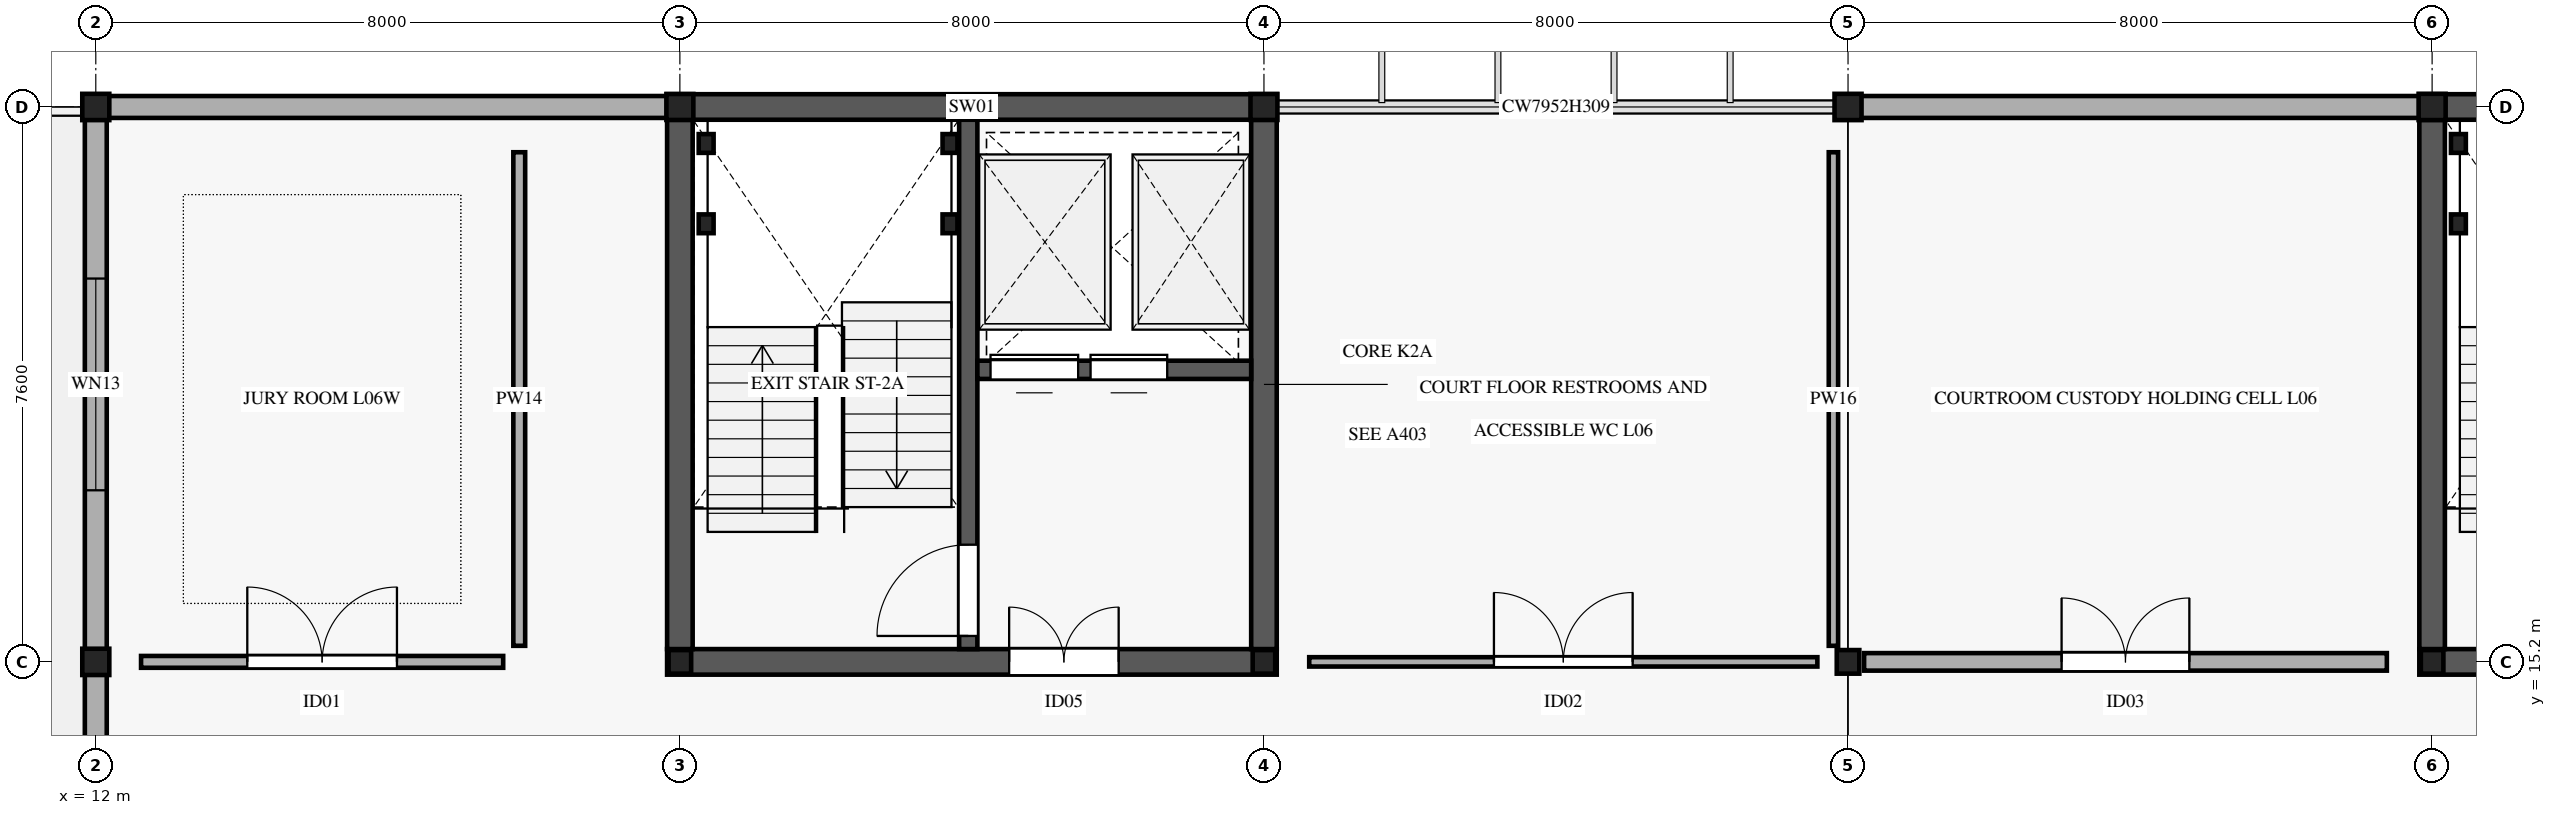
"""IFC4 building model, lengths in metres.
Left out: names, types, materials, properties, quantities, classifications, styles, units other than length and angle.
Written with IfcOpenShell. Run it as: python <this file> out.ifc"""

import sys

from ifc_helpers import new_model, si_unit, direction, frame, frame_2d, origin, origin_2d, place, context, subcontext, project, spatial, rectangle, i_section, extrude, element, fill, save


model = new_model("IFC4")
c1 = context("Model", 3, precision=1e-05, world=origin(), true_north=direction((0.0, 1.0)))
c2 = subcontext(c1, "Body", "Model", "MODEL_VIEW")
j1 = project(units=[si_unit("LENGTHUNIT", "METRE"), si_unit("PLANEANGLEUNIT", "RADIAN")], contexts=[c1])
p1 = place(None, origin())
s1 = spatial("IfcSite", under=j1, at=p1, CompositionType="ELEMENT")
p2 = place(p1, origin())
s2 = spatial("IfcBuilding", under=s1, at=p2, CompositionType="ELEMENT")
p3 = place(p2, frame((0.0, 0.0, 29.4)))
s3 = spatial("IfcBuildingStorey", under=s2, at=p3, CompositionType="ELEMENT", Elevation=29.4)
for number, where, z_axis, x_axis in (
    (1, (12.0, 15.2, 0.0), (0.0, 0.0, 1.0), (1.0, 0.0, 0.0)),
    (2, (12.0, 22.8, 0.0), (0.0, 0.0, 1.0), (1.0, 0.0, 0.0)),
):
    element("IfcColumn", number, at=place(p3, frame(where, z_axis=z_axis, x_axis=x_axis)), inside=s3, PredefinedType="COLUMN", context=c2, shape_type="SweptSolid", body=[
        extrude(i_section(OverallWidth=0.37, OverallDepth=0.36, WebThickness=0.012, FlangeThickness=0.02, FilletRadius=0.015, at=origin_2d()), origin(), (0.0, 0.0, 1.0), 4.0),
    ])
p4 = place(p3, frame((20.0, 15.2, 0.0), z_axis=(0.0, 0.0, 1.0), x_axis=(1.0, 0.0, 0.0)))
e3 = element("IfcColumn", 3, at=p4, inside=s3, PredefinedType="COLUMN", context=c2, shape_type="SweptSolid", body=[
    extrude(i_section(OverallWidth=0.309, OverallDepth=0.323, WebThickness=0.014, FlangeThickness=0.023, FilletRadius=0.015, at=origin_2d()), origin(), (0.0, 0.0, 1.0), 4.0),
])
p5 = place(p3, frame((20.0, 22.8, 0.0), z_axis=(0.0, 0.0, 1.0), x_axis=(1.0, 0.0, 0.0)))
e4 = element("IfcColumn", 4, at=p5, inside=s3, PredefinedType="COLUMN", context=c2, shape_type="SweptSolid", body=[
    extrude(i_section(OverallWidth=0.369, OverallDepth=0.356, WebThickness=0.011, FlangeThickness=0.018, FilletRadius=0.015, at=origin_2d()), origin(), (0.0, 0.0, 1.0), 4.0),
])
p6 = place(p3, frame((28.0, 15.2, 0.0), z_axis=(0.0, 0.0, 1.0), x_axis=(1.0, 0.0, 0.0)))
e5 = element("IfcColumn", 5, at=p6, inside=s3, PredefinedType="COLUMN", context=c2, shape_type="SweptSolid", body=[
    extrude(i_section(OverallWidth=0.309, OverallDepth=0.323, WebThickness=0.014, FlangeThickness=0.023, FilletRadius=0.015, at=origin_2d()), origin(), (0.0, 0.0, 1.0), 4.0),
])
p7 = place(p3, frame((28.0, 22.8, 0.0), z_axis=(0.0, 0.0, 1.0), x_axis=(1.0, 0.0, 0.0)))
e6 = element("IfcColumn", 6, at=p7, inside=s3, PredefinedType="COLUMN", context=c2, shape_type="SweptSolid", body=[
    extrude(i_section(OverallWidth=0.369, OverallDepth=0.356, WebThickness=0.011, FlangeThickness=0.018, FilletRadius=0.015, at=origin_2d()), origin(), (0.0, 0.0, 1.0), 4.0),
])
p8 = place(p3, frame((36.0, 15.2, 0.0), z_axis=(0.0, 0.0, 1.0), x_axis=(1.0, 0.0, 0.0)))
e7 = element("IfcColumn", 7, at=p8, inside=s3, PredefinedType="COLUMN", context=c2, shape_type="SweptSolid", body=[
    extrude(i_section(OverallWidth=0.309, OverallDepth=0.323, WebThickness=0.014, FlangeThickness=0.023, FilletRadius=0.015, at=origin_2d()), origin(), (0.0, 0.0, 1.0), 4.0),
])
p9 = place(p3, frame((36.0, 22.8, 0.0), z_axis=(0.0, 0.0, 1.0), x_axis=(1.0, 0.0, 0.0)))
e8 = element("IfcColumn", 8, at=p9, inside=s3, PredefinedType="COLUMN", context=c2, shape_type="SweptSolid", body=[
    extrude(i_section(OverallWidth=0.37, OverallDepth=0.36, WebThickness=0.012, FlangeThickness=0.02, FilletRadius=0.015, at=origin_2d()), origin(), (0.0, 0.0, 1.0), 4.0),
])
p10 = place(p3, frame((44.0, 15.2, 0.0), z_axis=(0.0, 0.0, 1.0), x_axis=(1.0, 0.0, 0.0)))
e9 = element("IfcColumn", 9, at=p10, inside=s3, PredefinedType="COLUMN", context=c2, shape_type="SweptSolid", body=[
    extrude(i_section(OverallWidth=0.309, OverallDepth=0.323, WebThickness=0.014, FlangeThickness=0.023, FilletRadius=0.015, at=origin_2d()), origin(), (0.0, 0.0, 1.0), 4.0),
])
p11 = place(p3, frame((44.0, 22.8, 0.0), z_axis=(0.0, 0.0, 1.0), x_axis=(1.0, 0.0, 0.0)))
e10 = element("IfcColumn", 10, at=p11, inside=s3, PredefinedType="COLUMN", context=c2, shape_type="SweptSolid", body=[
    extrude(i_section(OverallWidth=0.37, OverallDepth=0.36, WebThickness=0.012, FlangeThickness=0.02, FilletRadius=0.015, at=origin_2d()), origin(), (0.0, 0.0, 1.0), 4.0),
])
p12 = place(p3, frame((12.0, 7.58, 0.0), z_axis=(0.0, 0.0, 1.0), x_axis=(0.0, 1.0, 0.0)))
e11 = element("IfcWall", 11, at=p12, inside=s3, PredefinedType="STANDARD", context=c2, shape_type="SweptSolid", body=[
    extrude(rectangle(XDim=7.64, YDim=0.3, at=frame_2d((3.82, 0.0))), origin(), (0.0, 0.0, 1.0), 3.06),
])
p13 = place(p12, frame((2.57, 0.0, 0.75)))
e12 = element("IfcOpeningElement", 12, at=p13, cuts=e11, PredefinedType="OPENING", context=c2, shape_type="SweptSolid", body=[
    extrude(rectangle(XDim=2.5, YDim=2.15, at=frame_2d((1.25, 1.075))), frame((0.0, 0.16, 0.0), z_axis=(0.0, -1.0, 0.0), x_axis=(1.0, 0.0, 0.0)), (0.0, 0.0, 1.0), 0.32),
])
p14 = place(p3, frame((12.0, 15.18, 0.0), z_axis=(0.0, 0.0, 1.0), x_axis=(0.0, 1.0, 0.0)))
e13 = element("IfcWall", 13, at=p14, inside=s3, PredefinedType="STANDARD", context=c2, shape_type="SweptSolid", body=[
    extrude(rectangle(XDim=7.64, YDim=0.3, at=frame_2d((3.82, 0.0))), origin(), (0.0, 0.0, 1.0), 3.06),
])
p15 = place(p14, frame((2.37, 0.0, 0.75)))
e14 = element("IfcOpeningElement", 14, at=p15, cuts=e13, PredefinedType="OPENING", context=c2, shape_type="SweptSolid", body=[
    extrude(rectangle(XDim=2.9, YDim=2.15, at=frame_2d((1.45, 1.075))), frame((0.0, 0.16, 0.0), z_axis=(0.0, -1.0, 0.0), x_axis=(1.0, 0.0, 0.0)), (0.0, 0.0, 1.0), 0.32),
])
for number, where, z_axis, x_axis in (
    (15, (11.98, 22.8, 0.0), (0.0, 0.0, 1.0), (1.0, 0.0, 0.0)),
    (16, (35.98, 22.8, 0.0), (0.0, 0.0, 1.0), (1.0, 0.0, 0.0)),
):
    element("IfcWall", number, at=place(p3, frame(where, z_axis=z_axis, x_axis=x_axis)), inside=s3, PredefinedType="STANDARD", context=c2, shape_type="SweptSolid", body=[
        extrude(rectangle(XDim=8.04, YDim=0.3, at=frame_2d((4.02, 0.0))), origin(), (0.0, 0.0, 1.0), 3.06),
    ])
p16 = place(p3, frame((19.825, 15.2, 0.0), z_axis=(0.0, 0.0, 1.0), x_axis=(1.0, 0.0, 0.0)))
e17 = element("IfcWall", 17, at=p16, inside=s3, PredefinedType="SHEAR", context=c2, shape_type="SweptSolid", body=[
    extrude(rectangle(XDim=8.35, YDim=0.35, at=frame_2d((4.175, 0.0))), origin(), (0.0, 0.0, 1.0), 3.99),
])
p17 = place(p16, frame((4.685, 0.0, 0.0)))
e18 = element("IfcOpeningElement", 18, at=p17, cuts=e17, PredefinedType="OPENING", context=c2, shape_type="SweptSolid", body=[
    extrude(rectangle(XDim=1.5, YDim=2.2, at=frame_2d((0.75, 1.1))), frame((0.0, 0.185, 0.0), z_axis=(0.0, -1.0, 0.0), x_axis=(1.0, 0.0, 0.0)), (0.0, 0.0, 1.0), 0.37),
])
p18 = place(p3, frame((19.825, 22.8, 0.0), z_axis=(0.0, 0.0, 1.0), x_axis=(1.0, 0.0, 0.0)))
e19 = element("IfcWall", 19, at=p18, inside=s3, PredefinedType="SHEAR", context=c2, shape_type="SweptSolid", body=[
    extrude(rectangle(XDim=8.35, YDim=0.35, at=frame_2d((4.175, 0.0))), origin(), (0.0, 0.0, 1.0), 3.99),
])
for number, where, z_axis, x_axis in (
    (20, (20.0, 15.375, 0.0), (0.0, 0.0, 1.0), (0.0, 1.0, 0.0)),
    (21, (28.0, 15.375, 0.0), (0.0, 0.0, 1.0), (0.0, 1.0, 0.0)),
):
    element("IfcWall", number, at=place(p3, frame(where, z_axis=z_axis, x_axis=x_axis)), inside=s3, PredefinedType="SHEAR", context=c2, shape_type="SweptSolid", body=[
        extrude(rectangle(XDim=7.25, YDim=0.35, at=frame_2d((3.625, 0.0))), origin(), (0.0, 0.0, 1.0), 3.99),
    ])
p19 = place(p3, frame((23.95, 15.375, 0.0), z_axis=(0.0, 0.0, 1.0), x_axis=(0.0, 1.0, 0.0)))
e22 = element("IfcWall", 22, at=p19, inside=s3, PredefinedType="SHEAR", context=c2, shape_type="SweptSolid", body=[
    extrude(rectangle(XDim=7.25, YDim=0.25, at=frame_2d((3.625, 0.0))), origin(), (0.0, 0.0, 1.0), 3.99),
])
p20 = place(p19, frame((0.18, 0.0, 0.0)))
e23 = element("IfcOpeningElement", 23, at=p20, cuts=e22, PredefinedType="OPENING", context=c2, shape_type="SweptSolid", body=[
    extrude(rectangle(XDim=1.25, YDim=2.2, at=frame_2d((0.625, 1.1))), frame((0.0, 0.135, 0.0), z_axis=(0.0, -1.0, 0.0), x_axis=(1.0, 0.0, 0.0)), (0.0, 0.0, 1.0), 0.27),
])
p21 = place(p3, frame((24.075, 19.2, 0.0), z_axis=(0.0, 0.0, 1.0), x_axis=(1.0, 0.0, 0.0)))
e24 = element("IfcWall", 24, at=p21, inside=s3, PredefinedType="SHEAR", context=c2, shape_type="SweptSolid", body=[
    extrude(rectangle(XDim=3.75, YDim=0.25, at=frame_2d((1.875, 0.0))), origin(), (0.0, 0.0, 1.0), 3.99),
])
p22 = place(p21, frame((0.18, 0.0, 0.0)))
e25 = element("IfcOpeningElement", 25, at=p22, cuts=e24, PredefinedType="OPENING", context=c2, shape_type="SweptSolid", body=[
    extrude(rectangle(XDim=1.2, YDim=2.2, at=frame_2d((0.6, 1.1))), frame((0.0, 0.135, 0.0), z_axis=(0.0, -1.0, 0.0), x_axis=(1.0, 0.0, 0.0)), (0.0, 0.0, 1.0), 0.27),
])
p23 = place(p21, frame((1.55, 0.0, 0.0)))
e26 = element("IfcOpeningElement", 26, at=p23, cuts=e24, PredefinedType="OPENING", context=c2, shape_type="SweptSolid", body=[
    extrude(rectangle(XDim=1.05, YDim=2.2, at=frame_2d((0.525, 1.1))), frame((0.0, 0.135, 0.0), z_axis=(0.0, -1.0, 0.0), x_axis=(1.0, 0.0, 0.0)), (0.0, 0.0, 1.0), 0.27),
])
for number, where, z_axis, x_axis in (
    (27, (20.36, 21.2, 0.0), (0.0, 0.0, 1.0), (1.0, 0.0, 0.0)),
    (28, (23.7, 21.2, 0.0), (0.0, 0.0, 1.0), (1.0, 0.0, 0.0)),
    (29, (20.36, 22.3, 0.0), (0.0, 0.0, 1.0), (1.0, 0.0, 0.0)),
    (30, (23.7, 22.3, 0.0), (0.0, 0.0, 1.0), (1.0, 0.0, 0.0)),
):
    element("IfcColumn", number, at=place(p3, frame(where, z_axis=z_axis, x_axis=x_axis)), inside=s3, PredefinedType="COLUMN", context=c2, shape_type="SweptSolid", body=[
        extrude(i_section(OverallWidth=0.204, OverallDepth=0.257, WebThickness=0.009, FlangeThickness=0.016, FilletRadius=0.013, at=origin_2d()), origin(), (0.0, 0.0, 1.0), 4.195),
    ])
p24 = place(p3, frame((43.825, 15.2, 0.0), z_axis=(0.0, 0.0, 1.0), x_axis=(1.0, 0.0, 0.0)))
e31 = element("IfcWall", 31, at=p24, inside=s3, PredefinedType="SHEAR", context=c2, shape_type="SweptSolid", body=[
    extrude(rectangle(XDim=8.35, YDim=0.35, at=frame_2d((4.175, 0.0))), origin(), (0.0, 0.0, 1.0), 3.99),
])
p25 = place(p24, frame((4.685, 0.0, 0.0)))
e32 = element("IfcOpeningElement", 32, at=p25, cuts=e31, PredefinedType="OPENING", context=c2, shape_type="SweptSolid", body=[
    extrude(rectangle(XDim=1.5, YDim=2.2, at=frame_2d((0.75, 1.1))), frame((0.0, 0.185, 0.0), z_axis=(0.0, -1.0, 0.0), x_axis=(1.0, 0.0, 0.0)), (0.0, 0.0, 1.0), 0.37),
])
p26 = place(p3, frame((43.825, 22.8, 0.0), z_axis=(0.0, 0.0, 1.0), x_axis=(1.0, 0.0, 0.0)))
e33 = element("IfcWall", 33, at=p26, inside=s3, PredefinedType="SHEAR", context=c2, shape_type="SweptSolid", body=[
    extrude(rectangle(XDim=8.35, YDim=0.35, at=frame_2d((4.175, 0.0))), origin(), (0.0, 0.0, 1.0), 3.99),
])
p27 = place(p3, frame((44.0, 15.375, 0.0), z_axis=(0.0, 0.0, 1.0), x_axis=(0.0, 1.0, 0.0)))
e34 = element("IfcWall", 34, at=p27, inside=s3, PredefinedType="SHEAR", context=c2, shape_type="SweptSolid", body=[
    extrude(rectangle(XDim=7.25, YDim=0.35, at=frame_2d((3.625, 0.0))), origin(), (0.0, 0.0, 1.0), 3.99),
])
for number, where, z_axis, x_axis in (
    (35, (44.36, 21.2, 0.0), (0.0, 0.0, 1.0), (1.0, 0.0, 0.0)),
    (36, (44.36, 22.3, 0.0), (0.0, 0.0, 1.0), (1.0, 0.0, 0.0)),
):
    element("IfcColumn", number, at=place(p3, frame(where, z_axis=z_axis, x_axis=x_axis)), inside=s3, PredefinedType="COLUMN", context=c2, shape_type="SweptSolid", body=[
        extrude(i_section(OverallWidth=0.204, OverallDepth=0.257, WebThickness=0.009, FlangeThickness=0.016, FilletRadius=0.013, at=origin_2d()), origin(), (0.0, 0.0, 1.0), 4.195),
    ])
p28 = place(p3, frame((12.62, 15.2, 0.0), z_axis=(0.0, 0.0, 1.0), x_axis=(1.0, 0.0, 0.0)))
e37 = element("IfcWall", 37, at=p28, inside=s3, PredefinedType="PARTITIONING", context=c2, shape_type="SweptSolid", body=[
    extrude(rectangle(XDim=4.96, YDim=0.162, at=frame_2d((2.48, 0.0))), origin(), (0.0, 0.0, 1.0), 2.85),
])
p29 = place(p28, frame((1.455, 0.0, 0.0)))
e38 = element("IfcOpeningElement", 38, at=p29, cuts=e37, PredefinedType="OPENING", context=c2, shape_type="SweptSolid", body=[
    extrude(rectangle(XDim=2.05, YDim=2.45, at=frame_2d((1.025, 1.225))), frame((0.0, 0.091, 0.0), z_axis=(0.0, -1.0, 0.0), x_axis=(1.0, 0.0, 0.0)), (0.0, 0.0, 1.0), 0.182),
])
p30 = place(p3, frame((17.8, 15.42, 0.0), z_axis=(0.0, 0.0, 1.0), x_axis=(0.0, 1.0, 0.0)))
e39 = element("IfcWall", 39, at=p30, inside=s3, PredefinedType="PARTITIONING", context=c2, shape_type="SweptSolid", body=[
    extrude(rectangle(XDim=6.76, YDim=0.162, at=frame_2d((3.38, 0.0))), origin(), (0.0, 0.0, 1.0), 2.85),
])
p31 = place(p3, frame((28.62, 15.2, 0.0), z_axis=(0.0, 0.0, 1.0), x_axis=(1.0, 0.0, 0.0)))
e40 = element("IfcWall", 40, at=p31, inside=s3, PredefinedType="PARTITIONING", context=c2, shape_type="SweptSolid", body=[
    extrude(rectangle(XDim=6.96, YDim=0.128, at=frame_2d((3.48, 0.0))), origin(), (0.0, 0.0, 1.0), 2.85),
])
p32 = place(p31, frame((2.53, 0.0, 0.0)))
e41 = element("IfcOpeningElement", 41, at=p32, cuts=e40, PredefinedType="OPENING", context=c2, shape_type="SweptSolid", body=[
    extrude(rectangle(XDim=1.9, YDim=2.4, at=frame_2d((0.95, 1.2))), frame((0.0, 0.074, 0.0), z_axis=(0.0, -1.0, 0.0), x_axis=(1.0, 0.0, 0.0)), (0.0, 0.0, 1.0), 0.148),
])
p33 = place(p3, frame((35.8, 15.42, 0.0), z_axis=(0.0, 0.0, 1.0), x_axis=(0.0, 1.0, 0.0)))
e42 = element("IfcWall", 42, at=p33, inside=s3, PredefinedType="PARTITIONING", context=c2, shape_type="SweptSolid", body=[
    extrude(rectangle(XDim=6.76, YDim=0.128, at=frame_2d((3.38, 0.0))), origin(), (0.0, 0.0, 1.0), 2.85),
])
p34 = place(p3, frame((36.22, 15.2, 0.0), z_axis=(0.0, 0.0, 1.0), x_axis=(1.0, 0.0, 0.0)))
e43 = element("IfcWall", 43, at=p34, inside=s3, PredefinedType="PARTITIONING", context=c2, shape_type="SweptSolid", body=[
    extrude(rectangle(XDim=7.16, YDim=0.24, at=frame_2d((3.58, 0.0))), origin(), (0.0, 0.0, 1.0), 2.85),
])
p35 = place(p34, frame((2.705, 0.0, 0.0)))
e44 = element("IfcOpeningElement", 44, at=p35, cuts=e43, PredefinedType="OPENING", context=c2, shape_type="SweptSolid", body=[
    extrude(rectangle(XDim=1.75, YDim=2.35, at=frame_2d((0.875, 1.175))), frame((0.0, 0.13, 0.0), z_axis=(0.0, -1.0, 0.0), x_axis=(1.0, 0.0, 0.0)), (0.0, 0.0, 1.0), 0.26),
])
p36 = place(p15, origin())
e45 = element("IfcWindow", 45, at=p36, inside=s3, PartitioningType="SINGLE_PANEL", PredefinedType="WINDOW", context=c2, shape_type="SweptSolid", body=[
    extrude(rectangle(XDim=2.9, YDim=2.15, at=frame_2d((1.45, 1.075))), frame((0.0, 0.03, 0.0), z_axis=(0.0, -1.0, 0.0), x_axis=(1.0, 0.0, 0.0)), (0.0, 0.0, 1.0), 0.06),
])
fill(e14, e45)
p37 = place(p20, origin())
e46 = element("IfcDoor", 46, at=p37, inside=s3, OperationType="SINGLE_SWING_LEFT", PredefinedType="DOOR", context=c2, shape_type="SweptSolid", body=[
    extrude(rectangle(XDim=1.25, YDim=2.2, at=frame_2d((0.625, 1.1))), frame((0.0, 0.025, 0.0), z_axis=(0.0, -1.0, 0.0), x_axis=(1.0, 0.0, 0.0)), (0.0, 0.0, 1.0), 0.05),
])
fill(e23, e46)
p38 = place(p17, origin())
e47 = element("IfcDoor", 47, at=p38, inside=s3, OperationType="DOUBLE_DOOR_SINGLE_SWING", PredefinedType="DOOR", context=c2, shape_type="SweptSolid", body=[
    extrude(rectangle(XDim=1.5, YDim=2.2, at=frame_2d((0.75, 1.1))), frame((0.0, 0.025, 0.0), z_axis=(0.0, -1.0, 0.0), x_axis=(1.0, 0.0, 0.0)), (0.0, 0.0, 1.0), 0.05),
])
fill(e18, e47)
p39 = place(p22, origin())
e48 = element("IfcDoor", 48, at=p39, inside=s3, OperationType="SLIDING_TO_LEFT", PredefinedType="DOOR", context=c2, shape_type="SweptSolid", body=[
    extrude(rectangle(XDim=1.2, YDim=2.2, at=frame_2d((0.6, 1.1))), frame((0.0, 0.025, 0.0), z_axis=(0.0, -1.0, 0.0), x_axis=(1.0, 0.0, 0.0)), (0.0, 0.0, 1.0), 0.05),
])
fill(e25, e48)
p40 = place(p23, origin())
e49 = element("IfcDoor", 49, at=p40, inside=s3, OperationType="SLIDING_TO_RIGHT", PredefinedType="DOOR", context=c2, shape_type="SweptSolid", body=[
    extrude(rectangle(XDim=1.05, YDim=2.2, at=frame_2d((0.525, 1.1))), frame((0.0, 0.025, 0.0), z_axis=(0.0, -1.0, 0.0), x_axis=(1.0, 0.0, 0.0)), (0.0, 0.0, 1.0), 0.05),
])
fill(e26, e49)
p41 = place(p29, origin())
e50 = element("IfcDoor", 50, at=p41, inside=s3, OperationType="DOUBLE_DOOR_SINGLE_SWING", PredefinedType="DOOR", context=c2, shape_type="SweptSolid", body=[
    extrude(rectangle(XDim=2.05, YDim=2.45, at=frame_2d((1.025, 1.225))), frame((0.0, 0.025, 0.0), z_axis=(0.0, -1.0, 0.0), x_axis=(1.0, 0.0, 0.0)), (0.0, 0.0, 1.0), 0.05),
])
fill(e38, e50)
p42 = place(p32, origin())
e51 = element("IfcDoor", 51, at=p42, inside=s3, OperationType="DOUBLE_DOOR_SINGLE_SWING", PredefinedType="DOOR", context=c2, shape_type="SweptSolid", body=[
    extrude(rectangle(XDim=1.9, YDim=2.4, at=frame_2d((0.95, 1.2))), frame((0.0, 0.025, 0.0), z_axis=(0.0, -1.0, 0.0), x_axis=(1.0, 0.0, 0.0)), (0.0, 0.0, 1.0), 0.05),
])
fill(e41, e51)
p43 = place(p35, origin())
e52 = element("IfcDoor", 52, at=p43, inside=s3, OperationType="DOUBLE_DOOR_SINGLE_SWING", PredefinedType="DOOR", context=c2, shape_type="SweptSolid", body=[
    extrude(rectangle(XDim=1.75, YDim=2.35, at=frame_2d((0.875, 1.175))), frame((0.0, 0.025, 0.0), z_axis=(0.0, -1.0, 0.0), x_axis=(1.0, 0.0, 0.0)), (0.0, 0.0, 1.0), 0.05),
])
fill(e44, e52)
save(model, sys.argv[1])
